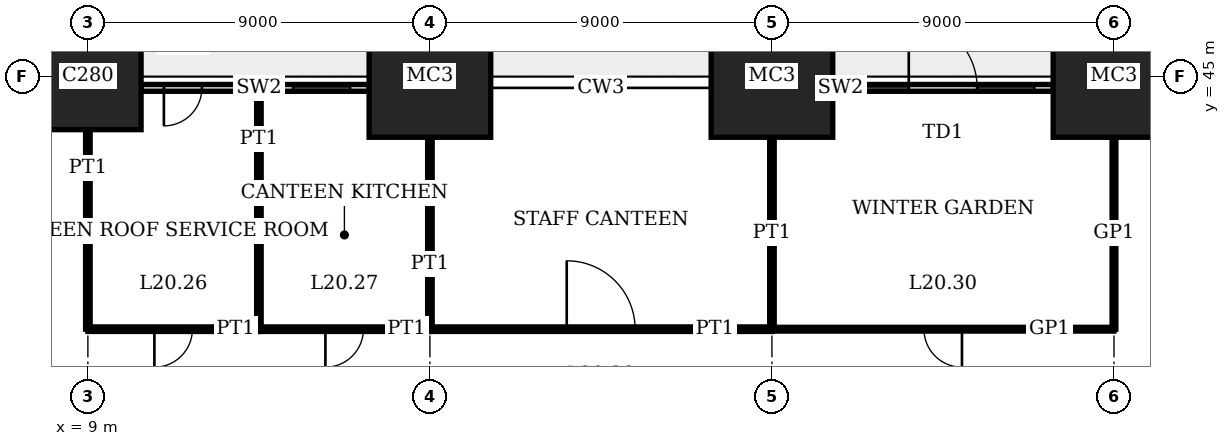
"""IFC4 building model, lengths in metres.
Left out: names, types, materials, properties, quantities, classifications, styles, units other than length and angle.
Written with IfcOpenShell. Run it as: python <this file> out.ifc"""

import sys

from ifc_helpers import new_model, si_unit, direction, frame, frame_2d, origin, origin_2d, place, context, subcontext, project, spatial, rectangle, extrude, element, fill, save


model = new_model("IFC4")
c1 = context("Model", 3, precision=1e-05, world=origin(), true_north=direction((0.0, 1.0)))
c2 = subcontext(c1, "Body", "Model", "MODEL_VIEW")
j1 = project(units=[si_unit("LENGTHUNIT", "METRE"), si_unit("PLANEANGLEUNIT", "RADIAN")], contexts=[c1])
p1 = place(None, origin())
s1 = spatial("IfcSite", under=j1, at=p1, CompositionType="ELEMENT")
p2 = place(p1, origin())
s2 = spatial("IfcBuilding", under=s1, at=p2, CompositionType="ELEMENT")
p3 = place(p2, frame((0.0, 0.0, 85.0)))
s3 = spatial("IfcBuildingStorey", under=s2, at=p3, CompositionType="ELEMENT", Elevation=85.0)
p4 = place(p3, frame((9.0, 45.0, 0.0), z_axis=(0.0, 0.0, 1.0), x_axis=(1.0, 0.0, 0.0)))
e1 = element("IfcColumn", 1, at=p4, inside=s3, PredefinedType="COLUMN", context=c2, shape_type="SweptSolid", body=[
    extrude(rectangle(XDim=2.8, YDim=2.8, at=origin_2d()), origin(), (0.0, 0.0, 1.0), 4.0),
])
for number, where, z_axis, x_axis in (
    (2, (18.0, 45.0, 0.0), (0.0, 0.0, 1.0), (1.0, 0.0, 0.0)),
    (3, (27.0, 45.0, 0.0), (0.0, 0.0, 1.0), (1.0, 0.0, 0.0)),
    (4, (36.0, 45.0, 0.0), (0.0, 0.0, 1.0), (1.0, 0.0, 0.0)),
):
    element("IfcColumn", number, at=place(p3, frame(where, z_axis=z_axis, x_axis=x_axis)), inside=s3, PredefinedType="COLUMN", context=c2, shape_type="SweptSolid", body=[
        extrude(rectangle(XDim=3.2, YDim=3.2, at=origin_2d()), origin(), (0.0, 0.0, 1.0), 4.0),
    ])
p5 = place(p3, frame((10.4, 44.7, 0.0), z_axis=(0.0, 0.0, 1.0), x_axis=(1.0, 0.0, 0.0)))
e5 = element("IfcWall", 5, at=p5, inside=s3, PredefinedType="SOLIDWALL", context=c2, shape_type="SweptSolid", body=[
    extrude(rectangle(XDim=6.0, YDim=0.18, at=frame_2d((3.0, 0.0))), origin(), (0.0, 0.0, 1.0), 2.95),
])
p6 = place(p5, frame((0.6, 0.0, 0.0)))
e6 = element("IfcOpeningElement", 6, at=p6, cuts=e5, PredefinedType="OPENING", context=c2, shape_type="SweptSolid", body=[
    extrude(rectangle(XDim=1.0, YDim=2.1, at=frame_2d((0.5, 1.05))), frame((0.0, 0.1, 0.0), z_axis=(0.0, -1.0, 0.0), x_axis=(1.0, 0.0, 0.0)), (0.0, 0.0, 1.0), 0.2),
])
p7 = place(p5, frame((4.0, 0.0, 0.3)))
e7 = element("IfcOpeningElement", 7, at=p7, cuts=e5, PredefinedType="OPENING", context=c2, shape_type="SweptSolid", body=[
    extrude(rectangle(XDim=1.5, YDim=2.4, at=frame_2d((0.75, 1.2))), frame((0.0, 0.1, 0.0), z_axis=(0.0, -1.0, 0.0), x_axis=(1.0, 0.0, 0.0)), (0.0, 0.0, 1.0), 0.2),
])
p8 = place(p3, frame((28.6, 44.7, 0.0), z_axis=(0.0, 0.0, 1.0), x_axis=(1.0, 0.0, 0.0)))
e8 = element("IfcWall", 8, at=p8, inside=s3, PredefinedType="SOLIDWALL", context=c2, shape_type="SweptSolid", body=[
    extrude(rectangle(XDim=5.8, YDim=0.18, at=frame_2d((2.9, 0.0))), origin(), (0.0, 0.0, 1.0), 2.95),
])
p9 = place(p8, frame((2.0, 0.0, 0.0)))
e9 = element("IfcOpeningElement", 9, at=p9, cuts=e8, PredefinedType="OPENING", context=c2, shape_type="SweptSolid", body=[
    extrude(rectangle(XDim=1.8, YDim=2.7, at=frame_2d((0.9, 1.35))), frame((0.0, 0.1, 0.0), z_axis=(0.0, -1.0, 0.0), x_axis=(1.0, 0.0, 0.0)), (0.0, 0.0, 1.0), 0.2),
])
p10 = place(p8, frame((0.5, 0.0, 0.3)))
e10 = element("IfcOpeningElement", 10, at=p10, cuts=e8, PredefinedType="OPENING", context=c2, shape_type="SweptSolid", body=[
    extrude(rectangle(XDim=1.5, YDim=2.4, at=frame_2d((0.75, 1.2))), frame((0.0, 0.1, 0.0), z_axis=(0.0, -1.0, 0.0), x_axis=(1.0, 0.0, 0.0)), (0.0, 0.0, 1.0), 0.2),
])
p11 = place(p8, frame((3.8, 0.0, 0.3)))
e11 = element("IfcOpeningElement", 11, at=p11, cuts=e8, PredefinedType="OPENING", context=c2, shape_type="SweptSolid", body=[
    extrude(rectangle(XDim=1.5, YDim=2.4, at=frame_2d((0.75, 1.2))), frame((0.0, 0.1, 0.0), z_axis=(0.0, -1.0, 0.0), x_axis=(1.0, 0.0, 0.0)), (0.0, 0.0, 1.0), 0.2),
])
p12 = place(p3, frame((9.0, 38.35, 0.0), z_axis=(0.0, 0.0, 1.0), x_axis=(1.0, 0.0, 0.0)))
e12 = element("IfcWall", 12, at=p12, inside=s3, PredefinedType="PARTITIONING", context=c2, shape_type="SweptSolid", body=[
    extrude(rectangle(XDim=4.5, YDim=0.12, at=frame_2d((2.25, 0.0))), origin(), (0.0, 0.0, 1.0), 3.75),
])
p13 = place(p12, frame((1.75, 0.0, 0.0)))
e13 = element("IfcOpeningElement", 13, at=p13, cuts=e12, PredefinedType="OPENING", context=c2, shape_type="SweptSolid", body=[
    extrude(rectangle(XDim=1.0, YDim=2.4, at=frame_2d((0.5, 1.2))), frame((0.0, 0.07, 0.0), z_axis=(0.0, -1.0, 0.0), x_axis=(1.0, 0.0, 0.0)), (0.0, 0.0, 1.0), 0.14),
])
p14 = place(p3, frame((13.5, 38.35, 0.0), z_axis=(0.0, 0.0, 1.0), x_axis=(1.0, 0.0, 0.0)))
e14 = element("IfcWall", 14, at=p14, inside=s3, PredefinedType="PARTITIONING", context=c2, shape_type="SweptSolid", body=[
    extrude(rectangle(XDim=4.5, YDim=0.12, at=frame_2d((2.25, 0.0))), origin(), (0.0, 0.0, 1.0), 3.75),
])
p15 = place(p14, frame((1.75, 0.0, 0.0)))
e15 = element("IfcOpeningElement", 15, at=p15, cuts=e14, PredefinedType="OPENING", context=c2, shape_type="SweptSolid", body=[
    extrude(rectangle(XDim=1.0, YDim=2.4, at=frame_2d((0.5, 1.2))), frame((0.0, 0.07, 0.0), z_axis=(0.0, -1.0, 0.0), x_axis=(1.0, 0.0, 0.0)), (0.0, 0.0, 1.0), 0.14),
])
p16 = place(p3, frame((18.0, 38.35, 0.0), z_axis=(0.0, 0.0, 1.0), x_axis=(1.0, 0.0, 0.0)))
e16 = element("IfcWall", 16, at=p16, inside=s3, PredefinedType="PARTITIONING", context=c2, shape_type="SweptSolid", body=[
    extrude(rectangle(XDim=9.0, YDim=0.12, at=frame_2d((4.5, 0.0))), origin(), (0.0, 0.0, 1.0), 3.75),
])
p17 = place(p16, frame((3.6, 0.0, 0.0)))
e17 = element("IfcOpeningElement", 17, at=p17, cuts=e16, PredefinedType="OPENING", context=c2, shape_type="SweptSolid", body=[
    extrude(rectangle(XDim=1.8, YDim=2.4, at=frame_2d((0.9, 1.2))), frame((0.0, 0.07, 0.0), z_axis=(0.0, -1.0, 0.0), x_axis=(1.0, 0.0, 0.0)), (0.0, 0.0, 1.0), 0.14),
])
p18 = place(p3, frame((27.0, 38.35, 0.0), z_axis=(0.0, 0.0, 1.0), x_axis=(1.0, 0.0, 0.0)))
e18 = element("IfcWall", 18, at=p18, inside=s3, PredefinedType="PARTITIONING", context=c2, shape_type="SweptSolid", body=[
    extrude(rectangle(XDim=9.0, YDim=0.1, at=frame_2d((4.5, 0.0))), origin(), (0.0, 0.0, 1.0), 3.75),
])
p19 = place(p18, frame((4.0, 0.0, 0.0)))
e19 = element("IfcOpeningElement", 19, at=p19, cuts=e18, PredefinedType="OPENING", context=c2, shape_type="SweptSolid", body=[
    extrude(rectangle(XDim=1.0, YDim=2.4, at=frame_2d((0.5, 1.2))), frame((0.0, 0.06, 0.0), z_axis=(0.0, -1.0, 0.0), x_axis=(1.0, 0.0, 0.0)), (0.0, 0.0, 1.0), 0.12),
])
p20 = place(p3, frame((9.0, 38.35, 0.0), z_axis=(0.0, 0.0, 1.0), x_axis=(0.0, 1.0, 0.0)))
e20 = element("IfcWall", 20, at=p20, inside=s3, PredefinedType="PARTITIONING", context=c2, shape_type="SweptSolid", body=[
    extrude(rectangle(XDim=5.25, YDim=0.12, at=frame_2d((2.625, 0.0))), origin(), (0.0, 0.0, 1.0), 3.05),
])
p21 = place(p3, frame((13.5, 38.35, 0.0), z_axis=(0.0, 0.0, 1.0), x_axis=(0.0, 1.0, 0.0)))
e21 = element("IfcWall", 21, at=p21, inside=s3, PredefinedType="PARTITIONING", context=c2, shape_type="SweptSolid", body=[
    extrude(rectangle(XDim=6.34, YDim=0.12, at=frame_2d((3.17, 0.0))), origin(), (0.0, 0.0, 1.0), 3.75),
])
for number, where, z_axis, x_axis in (
    (22, (18.0, 38.35, 0.0), (0.0, 0.0, 1.0), (0.0, 1.0, 0.0)),
    (23, (27.0, 38.35, 0.0), (0.0, 0.0, 1.0), (0.0, 1.0, 0.0)),
):
    element("IfcWall", number, at=place(p3, frame(where, z_axis=z_axis, x_axis=x_axis)), inside=s3, PredefinedType="PARTITIONING", context=c2, shape_type="SweptSolid", body=[
        extrude(rectangle(XDim=5.05, YDim=0.12, at=frame_2d((2.525, 0.0))), origin(), (0.0, 0.0, 1.0), 3.05),
    ])
p22 = place(p3, frame((36.0, 38.35, 0.0), z_axis=(0.0, 0.0, 1.0), x_axis=(0.0, 1.0, 0.0)))
e24 = element("IfcWall", 24, at=p22, inside=s3, PredefinedType="PARTITIONING", context=c2, shape_type="SweptSolid", body=[
    extrude(rectangle(XDim=5.05, YDim=0.1, at=frame_2d((2.525, 0.0))), origin(), (0.0, 0.0, 1.0), 3.05),
])
p23 = place(p6, origin())
e25 = element("IfcDoor", 25, at=p23, inside=s3, OperationType="SINGLE_SWING_LEFT", PredefinedType="DOOR", context=c2, shape_type="SweptSolid", body=[
    extrude(rectangle(XDim=1.0, YDim=2.1, at=frame_2d((0.5, 1.05))), frame((0.0, 0.035, 0.0), z_axis=(0.0, -1.0, 0.0), x_axis=(1.0, 0.0, 0.0)), (0.0, 0.0, 1.0), 0.07),
])
fill(e6, e25)
p24 = place(p7, origin())
e26 = element("IfcWindow", 26, at=p24, inside=s3, PartitioningType="SINGLE_PANEL", PredefinedType="WINDOW", context=c2, shape_type="SweptSolid", body=[
    extrude(rectangle(XDim=1.5, YDim=2.4, at=frame_2d((0.75, 1.2))), frame((0.0, 0.03, 0.0), z_axis=(0.0, -1.0, 0.0), x_axis=(1.0, 0.0, 0.0)), (0.0, 0.0, 1.0), 0.06),
])
fill(e7, e26)
p25 = place(p9, origin())
e27 = element("IfcDoor", 27, at=p25, inside=s3, OperationType="DOUBLE_DOOR_SINGLE_SWING", PredefinedType="DOOR", context=c2, shape_type="SweptSolid", body=[
    extrude(rectangle(XDim=1.8, YDim=2.7, at=frame_2d((0.9, 1.35))), frame((0.0, 0.035, 0.0), z_axis=(0.0, -1.0, 0.0), x_axis=(1.0, 0.0, 0.0)), (0.0, 0.0, 1.0), 0.07),
])
fill(e9, e27)
p26 = place(p10, origin())
e28 = element("IfcWindow", 28, at=p26, inside=s3, PartitioningType="SINGLE_PANEL", PredefinedType="WINDOW", context=c2, shape_type="SweptSolid", body=[
    extrude(rectangle(XDim=1.5, YDim=2.4, at=frame_2d((0.75, 1.2))), frame((0.0, 0.03, 0.0), z_axis=(0.0, -1.0, 0.0), x_axis=(1.0, 0.0, 0.0)), (0.0, 0.0, 1.0), 0.06),
])
fill(e10, e28)
p27 = place(p11, origin())
e29 = element("IfcWindow", 29, at=p27, inside=s3, PartitioningType="SINGLE_PANEL", PredefinedType="WINDOW", context=c2, shape_type="SweptSolid", body=[
    extrude(rectangle(XDim=1.5, YDim=2.4, at=frame_2d((0.75, 1.2))), frame((0.0, 0.03, 0.0), z_axis=(0.0, -1.0, 0.0), x_axis=(1.0, 0.0, 0.0)), (0.0, 0.0, 1.0), 0.06),
])
fill(e11, e29)
p28 = place(p13, origin())
e30 = element("IfcDoor", 30, at=p28, inside=s3, OperationType="SINGLE_SWING_LEFT", PredefinedType="DOOR", context=c2, shape_type="SweptSolid", body=[
    extrude(rectangle(XDim=1.0, YDim=2.4, at=frame_2d((0.5, 1.2))), frame((0.0, 0.025, 0.0), z_axis=(0.0, -1.0, 0.0), x_axis=(1.0, 0.0, 0.0)), (0.0, 0.0, 1.0), 0.05),
])
fill(e13, e30)
p29 = place(p15, origin())
e31 = element("IfcDoor", 31, at=p29, inside=s3, OperationType="SINGLE_SWING_LEFT", PredefinedType="DOOR", context=c2, shape_type="SweptSolid", body=[
    extrude(rectangle(XDim=1.0, YDim=2.4, at=frame_2d((0.5, 1.2))), frame((0.0, 0.025, 0.0), z_axis=(0.0, -1.0, 0.0), x_axis=(1.0, 0.0, 0.0)), (0.0, 0.0, 1.0), 0.05),
])
fill(e15, e31)
p30 = place(p17, origin())
e32 = element("IfcDoor", 32, at=p30, inside=s3, OperationType="DOUBLE_DOOR_SINGLE_SWING", PredefinedType="DOOR", context=c2, shape_type="SweptSolid", body=[
    extrude(rectangle(XDim=1.8, YDim=2.4, at=frame_2d((0.9, 1.2))), frame((0.0, 0.025, 0.0), z_axis=(0.0, -1.0, 0.0), x_axis=(1.0, 0.0, 0.0)), (0.0, 0.0, 1.0), 0.05),
])
fill(e17, e32)
p31 = place(p19, origin())
e33 = element("IfcDoor", 33, at=p31, inside=s3, OperationType="SINGLE_SWING_RIGHT", PredefinedType="DOOR", context=c2, shape_type="SweptSolid", body=[
    extrude(rectangle(XDim=1.0, YDim=2.4, at=frame_2d((0.5, 1.2))), frame((0.0, 0.02, 0.0), z_axis=(0.0, -1.0, 0.0), x_axis=(1.0, 0.0, 0.0)), (0.0, 0.0, 1.0), 0.04),
])
fill(e19, e33)
save(model, sys.argv[1])
